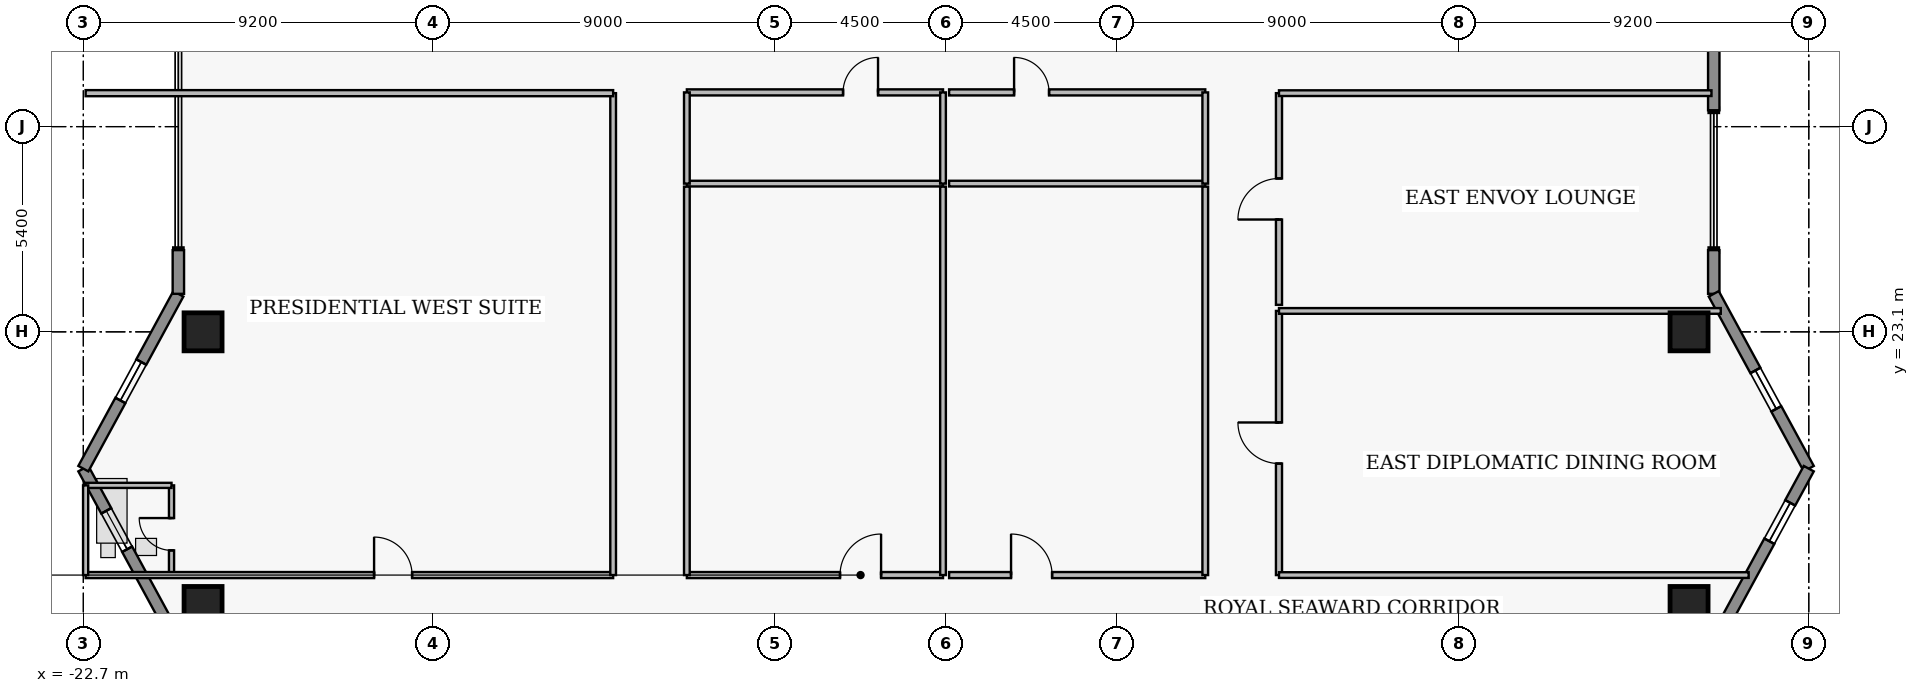
"""IFC4 building model, lengths in metres.
Left out: names, types, materials, properties, quantities, classifications, styles, units other than length and angle.
Written with IfcOpenShell. Run it as: python <this file> out.ifc"""

import sys

from ifc_helpers import new_model, si_unit, direction, frame, frame_2d, origin, origin_2d, place, context, subcontext, project, spatial, rectangle, extrude, element, fill, save


model = new_model("IFC4")
c1 = context("Model", 3, precision=1e-05, world=origin(), true_north=direction((0.0, 1.0)))
c2 = subcontext(c1, "Body", "Model", "MODEL_VIEW")
j1 = project(units=[si_unit("LENGTHUNIT", "METRE"), si_unit("PLANEANGLEUNIT", "RADIAN")], contexts=[c1])
p1 = place(None, origin())
s1 = spatial("IfcSite", under=j1, at=p1, CompositionType="ELEMENT")
p2 = place(p1, origin())
s2 = spatial("IfcBuilding", under=s1, at=p2, CompositionType="ELEMENT")
p3 = place(p2, frame((0.0, 0.0, 254.45)))
s3 = spatial("IfcBuildingStorey", under=s2, at=p3, CompositionType="ELEMENT", Elevation=254.45)
for number, where, z_axis, x_axis in (
    (1, (-19.55, 15.9, 0.0), (0.0, 0.0, 1.0), (1.0, 0.0, 0.0)),
    (2, (-19.55, 23.1, 0.0), (0.0, 0.0, 1.0), (1.0, 0.0, 0.0)),
    (3, (19.55, 15.9, 0.0), (0.0, 0.0, 1.0), (1.0, 0.0, 0.0)),
    (4, (19.55, 23.1, 0.0), (0.0, 0.0, 1.0), (1.0, 0.0, 0.0)),
):
    element("IfcColumn", number, at=place(p3, frame(where, z_axis=z_axis, x_axis=x_axis)), inside=s3, PredefinedType="COLUMN", context=c2, shape_type="SweptSolid", body=[
        extrude(rectangle(XDim=1.0, YDim=1.0, at=origin_2d()), origin(), (0.0, 0.0, 1.0), 3.7),
    ])
p4 = place(p3, frame((-20.2, 14.9, 0.0), z_axis=(0.0, 0.0, 1.0), x_axis=(-0.477505494629, 0.878628762675, 0.0)))
e5 = element("IfcWall", 5, at=p4, inside=s3, PredefinedType="STANDARD", context=c2, shape_type="SweptSolid", body=[
    extrude(rectangle(XDim=5.236, YDim=0.3, at=frame_2d((2.618, 0.0))), origin(), (0.0, 0.0, 1.0), 3.48),
])
p5 = place(p4, frame((2.823, 0.0, 1.25)))
e6 = element("IfcOpeningElement", 6, at=p5, cuts=e5, PredefinedType="OPENING", context=c2, shape_type="SweptSolid", body=[
    extrude(rectangle(XDim=1.15, YDim=1.55, at=frame_2d((0.575, 0.775))), frame((0.0, 0.16, 0.0), z_axis=(0.0, -1.0, 0.0), x_axis=(1.0, 0.0, 0.0)), (0.0, 0.0, 1.0), 0.32),
])
p6 = place(p3, frame((-22.7, 19.5, 0.0), z_axis=(0.0, 0.0, 1.0), x_axis=(0.477505494629, 0.878628762675, 0.0)))
e7 = element("IfcWall", 7, at=p6, inside=s3, PredefinedType="STANDARD", context=c2, shape_type="SweptSolid", body=[
    extrude(rectangle(XDim=5.236, YDim=0.3, at=frame_2d((2.618, 0.0))), origin(), (0.0, 0.0, 1.0), 3.48),
])
p7 = place(p6, frame((2.043, 0.0, 1.25)))
e8 = element("IfcOpeningElement", 8, at=p7, cuts=e7, PredefinedType="OPENING", context=c2, shape_type="SweptSolid", body=[
    extrude(rectangle(XDim=1.15, YDim=1.55, at=frame_2d((0.575, 0.775))), frame((0.0, 0.16, 0.0), z_axis=(0.0, -1.0, 0.0), x_axis=(1.0, 0.0, 0.0)), (0.0, 0.0, 1.0), 0.32),
])
p8 = place(p3, frame((-20.2, 24.1, 0.0), z_axis=(0.0, 0.0, 1.0), x_axis=(0.0, 1.0, 0.0)))
e9 = element("IfcWall", 9, at=p8, inside=s3, PredefinedType="STANDARD", context=c2, shape_type="SweptSolid", body=[
    extrude(rectangle(XDim=1.15, YDim=0.3, at=frame_2d((0.575, 0.0))), origin(), (0.0, 0.0, 1.0), 3.48),
])
p9 = place(p3, frame((20.2, 31.5, 0.0), z_axis=(0.0, 0.0, 1.0), x_axis=(0.0, -1.0, 0.0)))
e10 = element("IfcWall", 10, at=p9, inside=s3, PredefinedType="STANDARD", context=c2, shape_type="SweptSolid", body=[
    extrude(rectangle(XDim=2.57, YDim=0.3, at=frame_2d((1.285, 0.0))), origin(), (0.0, 0.0, 1.0), 3.48),
])
p10 = place(p3, frame((20.2, 25.25, 0.0), z_axis=(0.0, 0.0, 1.0), x_axis=(0.0, -1.0, 0.0)))
e11 = element("IfcWall", 11, at=p10, inside=s3, PredefinedType="STANDARD", context=c2, shape_type="SweptSolid", body=[
    extrude(rectangle(XDim=1.15, YDim=0.3, at=frame_2d((0.575, 0.0))), origin(), (0.0, 0.0, 1.0), 3.48),
])
p11 = place(p3, frame((20.2, 24.1, 0.0), z_axis=(0.0, 0.0, 1.0), x_axis=(0.477505494629, -0.878628762675, 0.0)))
e12 = element("IfcWall", 12, at=p11, inside=s3, PredefinedType="STANDARD", context=c2, shape_type="SweptSolid", body=[
    extrude(rectangle(XDim=5.236, YDim=0.3, at=frame_2d((2.618, 0.0))), origin(), (0.0, 0.0, 1.0), 3.48),
])
p12 = place(p11, frame((2.294, 0.0, 1.25)))
e13 = element("IfcOpeningElement", 13, at=p12, cuts=e12, PredefinedType="OPENING", context=c2, shape_type="SweptSolid", body=[
    extrude(rectangle(XDim=1.15, YDim=1.55, at=frame_2d((0.575, 0.775))), frame((0.0, 0.16, 0.0), z_axis=(0.0, -1.0, 0.0), x_axis=(1.0, 0.0, 0.0)), (0.0, 0.0, 1.0), 0.32),
])
p13 = place(p3, frame((22.7, 19.5, 0.0), z_axis=(0.0, 0.0, 1.0), x_axis=(-0.477505494629, -0.878628762675, 0.0)))
e14 = element("IfcWall", 14, at=p13, inside=s3, PredefinedType="STANDARD", context=c2, shape_type="SweptSolid", body=[
    extrude(rectangle(XDim=5.236, YDim=0.3, at=frame_2d((2.618, 0.0))), origin(), (0.0, 0.0, 1.0), 3.48),
])
p14 = place(p13, frame((1.023, 0.0, 1.25)))
e15 = element("IfcOpeningElement", 15, at=p14, cuts=e14, PredefinedType="OPENING", context=c2, shape_type="SweptSolid", body=[
    extrude(rectangle(XDim=1.15, YDim=1.55, at=frame_2d((0.575, 0.775))), frame((0.0, 0.16, 0.0), z_axis=(0.0, -1.0, 0.0), x_axis=(1.0, 0.0, 0.0)), (0.0, 0.0, 1.0), 0.32),
])
p15 = place(p3, frame((-6.82, 29.4, 0.0), z_axis=(0.0, 0.0, 1.0), x_axis=(1.0, 0.0, 0.0)))
e16 = element("IfcWall", 16, at=p15, inside=s3, PredefinedType="PARTITIONING", context=c2, shape_type="SweptSolid", body=[
    extrude(rectangle(XDim=6.74, YDim=0.16, at=frame_2d((3.37, 0.0))), origin(), (0.0, 0.0, 1.0), 3.48),
])
p16 = place(p15, frame((4.11, 0.0, 0.0)))
e17 = element("IfcOpeningElement", 17, at=p16, cuts=e16, PredefinedType="OPENING", context=c2, shape_type="SweptSolid", body=[
    extrude(rectangle(XDim=0.92, YDim=2.12, at=frame_2d((0.46, 1.06))), frame((0.0, 0.09, 0.0), z_axis=(0.0, -1.0, 0.0), x_axis=(1.0, 0.0, 0.0)), (0.0, 0.0, 1.0), 0.18),
])
p17 = place(p3, frame((0.08, 29.4, 0.0), z_axis=(0.0, 0.0, 1.0), x_axis=(1.0, 0.0, 0.0)))
e18 = element("IfcWall", 18, at=p17, inside=s3, PredefinedType="PARTITIONING", context=c2, shape_type="SweptSolid", body=[
    extrude(rectangle(XDim=6.74, YDim=0.16, at=frame_2d((3.37, 0.0))), origin(), (0.0, 0.0, 1.0), 3.48),
])
p18 = place(p17, frame((1.71, 0.0, 0.0)))
e19 = element("IfcOpeningElement", 19, at=p18, cuts=e18, PredefinedType="OPENING", context=c2, shape_type="SweptSolid", body=[
    extrude(rectangle(XDim=0.92, YDim=2.12, at=frame_2d((0.46, 1.06))), frame((0.0, 0.09, 0.0), z_axis=(0.0, -1.0, 0.0), x_axis=(1.0, 0.0, 0.0)), (0.0, 0.0, 1.0), 0.18),
])
p19 = place(p3, frame((-6.82, 16.7, 0.0), z_axis=(0.0, 0.0, 1.0), x_axis=(1.0, 0.0, 0.0)))
e20 = element("IfcWall", 20, at=p19, inside=s3, PredefinedType="PARTITIONING", context=c2, shape_type="SweptSolid", body=[
    extrude(rectangle(XDim=6.74, YDim=0.16, at=frame_2d((3.37, 0.0))), origin(), (0.0, 0.0, 1.0), 3.076),
])
p20 = place(p19, frame((4.03, 0.0, 0.0)))
e21 = element("IfcOpeningElement", 21, at=p20, cuts=e20, PredefinedType="OPENING", context=c2, shape_type="SweptSolid", body=[
    extrude(rectangle(XDim=1.08, YDim=2.18, at=frame_2d((0.54, 1.09))), frame((0.0, 0.09, 0.0), z_axis=(0.0, -1.0, 0.0), x_axis=(1.0, 0.0, 0.0)), (0.0, 0.0, 1.0), 0.18),
])
p21 = place(p3, frame((0.08, 16.7, 0.0), z_axis=(0.0, 0.0, 1.0), x_axis=(1.0, 0.0, 0.0)))
e22 = element("IfcWall", 22, at=p21, inside=s3, PredefinedType="PARTITIONING", context=c2, shape_type="SweptSolid", body=[
    extrude(rectangle(XDim=6.74, YDim=0.16, at=frame_2d((3.37, 0.0))), origin(), (0.0, 0.0, 1.0), 3.076),
])
p22 = place(p21, frame((1.63, 0.0, 0.0)))
e23 = element("IfcOpeningElement", 23, at=p22, cuts=e22, PredefinedType="OPENING", context=c2, shape_type="SweptSolid", body=[
    extrude(rectangle(XDim=1.08, YDim=2.18, at=frame_2d((0.54, 1.09))), frame((0.0, 0.09, 0.0), z_axis=(0.0, -1.0, 0.0), x_axis=(1.0, 0.0, 0.0)), (0.0, 0.0, 1.0), 0.18),
])
p23 = place(p3, frame((-20.38, 16.7, 0.0), z_axis=(0.0, 0.0, 1.0), x_axis=(0.0, 1.0, 0.0)))
e24 = element("IfcWall", 24, at=p23, inside=s3, PredefinedType="PLUMBINGWALL", context=c2, shape_type="SweptSolid", body=[
    extrude(rectangle(XDim=2.36, YDim=0.135, at=frame_2d((1.18, 0.0))), origin(), (0.0, 0.0, 1.0), 3.48),
])
p24 = place(p23, frame((0.65, 0.0, 0.0)))
e25 = element("IfcOpeningElement", 25, at=p24, cuts=e24, PredefinedType="OPENING", context=c2, shape_type="SweptSolid", body=[
    extrude(rectangle(XDim=0.85, YDim=2.1, at=frame_2d((0.425, 1.05))), frame((0.0, 0.077, 0.0), z_axis=(0.0, -1.0, 0.0), x_axis=(1.0, 0.0, 0.0)), (0.0, 0.0, 1.0), 0.155),
])
p25 = place(p3, frame((-22.64, 16.7, 0.0), z_axis=(0.0, 0.0, 1.0), x_axis=(1.0, 0.0, 0.0)))
e26 = element("IfcWall", 26, at=p25, inside=s3, PredefinedType="PARTITIONING", context=c2, shape_type="SweptSolid", body=[
    extrude(rectangle(XDim=13.88, YDim=0.16, at=frame_2d((6.94, 0.0))), origin(), (0.0, 0.0, 1.0), 3.076),
])
p26 = place(p25, frame((7.59, 0.0, 0.0)))
e27 = element("IfcOpeningElement", 27, at=p26, cuts=e26, PredefinedType="OPENING", context=c2, shape_type="SweptSolid", body=[
    extrude(rectangle(XDim=1.0, YDim=2.15, at=frame_2d((0.5, 1.075))), frame((0.0, 0.09, 0.0), z_axis=(0.0, -1.0, 0.0), x_axis=(1.0, 0.0, 0.0)), (0.0, 0.0, 1.0), 0.18),
])
p27 = place(p3, frame((8.76, 16.7, 0.0), z_axis=(0.0, 0.0, 1.0), x_axis=(0.0, 1.0, 0.0)))
e28 = element("IfcWall", 28, at=p27, inside=s3, PredefinedType="PARTITIONING", context=c2, shape_type="SweptSolid", body=[
    extrude(rectangle(XDim=6.95, YDim=0.16, at=frame_2d((3.475, 0.0))), origin(), (0.0, 0.0, 1.0), 3.48),
])
p28 = place(p27, frame((2.935, 0.0, 0.0)))
e29 = element("IfcOpeningElement", 29, at=p28, cuts=e28, PredefinedType="OPENING", context=c2, shape_type="SweptSolid", body=[
    extrude(rectangle(XDim=1.08, YDim=2.18, at=frame_2d((0.54, 1.09))), frame((0.0, 0.09, 0.0), z_axis=(0.0, -1.0, 0.0), x_axis=(1.0, 0.0, 0.0)), (0.0, 0.0, 1.0), 0.18),
])
p29 = place(p3, frame((8.76, 23.81, 0.0), z_axis=(0.0, 0.0, 1.0), x_axis=(0.0, 1.0, 0.0)))
e30 = element("IfcWall", 30, at=p29, inside=s3, PredefinedType="PARTITIONING", context=c2, shape_type="SweptSolid", body=[
    extrude(rectangle(XDim=5.57, YDim=0.16, at=frame_2d((2.785, 0.0))), origin(), (0.0, 0.0, 1.0), 3.48),
])
p30 = place(p29, frame((2.245, 0.0, 0.0)))
e31 = element("IfcOpeningElement", 31, at=p30, cuts=e30, PredefinedType="OPENING", context=c2, shape_type="SweptSolid", body=[
    extrude(rectangle(XDim=1.08, YDim=2.18, at=frame_2d((0.54, 1.09))), frame((0.0, 0.09, 0.0), z_axis=(0.0, -1.0, 0.0), x_axis=(1.0, 0.0, 0.0)), (0.0, 0.0, 1.0), 0.18),
])
p31 = place(p3, frame((-6.82, 27.0, 0.0), z_axis=(0.0, 0.0, 1.0), x_axis=(1.0, 0.0, 0.0)))
e32 = element("IfcWall", 32, at=p31, inside=s3, PredefinedType="PARTITIONING", context=c2, shape_type="SweptSolid", body=[
    extrude(rectangle(XDim=6.74, YDim=0.15, at=frame_2d((3.37, 0.0))), origin(), (0.0, 0.0, 1.0), 3.48),
])
for number, where, z_axis, x_axis in (
    (33, (-6.82, 27.0, 0.0), (0.0, 0.0, 1.0), (0.0, 1.0, 0.0)),
    (34, (-0.08, 27.0, 0.0), (0.0, 0.0, 1.0), (0.0, 1.0, 0.0)),
):
    element("IfcWall", number, at=place(p3, frame(where, z_axis=z_axis, x_axis=x_axis)), inside=s3, PredefinedType="PARTITIONING", context=c2, shape_type="SweptSolid", body=[
        extrude(rectangle(XDim=2.4, YDim=0.15, at=frame_2d((1.2, 0.0))), origin(), (0.0, 0.0, 1.0), 3.48),
    ])
p32 = place(p3, frame((0.08, 27.0, 0.0), z_axis=(0.0, 0.0, 1.0), x_axis=(1.0, 0.0, 0.0)))
e35 = element("IfcWall", 35, at=p32, inside=s3, PredefinedType="PARTITIONING", context=c2, shape_type="SweptSolid", body=[
    extrude(rectangle(XDim=6.74, YDim=0.15, at=frame_2d((3.37, 0.0))), origin(), (0.0, 0.0, 1.0), 3.48),
])
p33 = place(p3, frame((6.82, 27.0, 0.0), z_axis=(0.0, 0.0, 1.0), x_axis=(0.0, 1.0, 0.0)))
e36 = element("IfcWall", 36, at=p33, inside=s3, PredefinedType="PARTITIONING", context=c2, shape_type="SweptSolid", body=[
    extrude(rectangle(XDim=2.4, YDim=0.15, at=frame_2d((1.2, 0.0))), origin(), (0.0, 0.0, 1.0), 3.48),
])
for number, where, z_axis, x_axis in (
    (37, (-6.82, 16.7, 0.0), (0.0, 0.0, 1.0), (0.0, 1.0, 0.0)),
    (38, (-0.08, 16.7, 0.0), (0.0, 0.0, 1.0), (0.0, 1.0, 0.0)),
    (39, (6.82, 16.7, 0.0), (0.0, 0.0, 1.0), (0.0, 1.0, 0.0)),
):
    element("IfcWall", number, at=place(p3, frame(where, z_axis=z_axis, x_axis=x_axis)), inside=s3, PredefinedType="PARTITIONING", context=c2, shape_type="SweptSolid", body=[
        extrude(rectangle(XDim=10.22, YDim=0.15, at=frame_2d((5.11, 0.0))), origin(), (0.0, 0.0, 1.0), 3.48),
    ])
p34 = place(p3, frame((-22.64, 19.06, 0.0), z_axis=(0.0, 0.0, 1.0), x_axis=(1.0, 0.0, 0.0)))
e40 = element("IfcWall", 40, at=p34, inside=s3, PredefinedType="PLUMBINGWALL", context=c2, shape_type="SweptSolid", body=[
    extrude(rectangle(XDim=2.26, YDim=0.135, at=frame_2d((1.13, 0.0))), origin(), (0.0, 0.0, 1.0), 3.48),
])
p35 = place(p3, frame((-22.64, 16.7, 0.0), z_axis=(0.0, 0.0, 1.0), x_axis=(0.0, 1.0, 0.0)))
e41 = element("IfcWall", 41, at=p35, inside=s3, PredefinedType="PLUMBINGWALL", context=c2, shape_type="SweptSolid", body=[
    extrude(rectangle(XDim=2.36, YDim=0.135, at=frame_2d((1.18, 0.0))), origin(), (0.0, 0.0, 1.0), 3.48),
])
p36 = place(p3, frame((-8.76, 16.7, 0.0), z_axis=(0.0, 0.0, 1.0), x_axis=(0.0, 1.0, 0.0)))
e42 = element("IfcWall", 42, at=p36, inside=s3, PredefinedType="PARTITIONING", context=c2, shape_type="SweptSolid", body=[
    extrude(rectangle(XDim=12.68, YDim=0.15, at=frame_2d((6.34, 0.0))), origin(), (0.0, 0.0, 1.0), 3.48),
])
p37 = place(p3, frame((-22.64, 29.38, 0.0), z_axis=(0.0, 0.0, 1.0), x_axis=(1.0, 0.0, 0.0)))
e43 = element("IfcWall", 43, at=p37, inside=s3, PredefinedType="PARTITIONING", context=c2, shape_type="SweptSolid", body=[
    extrude(rectangle(XDim=13.88, YDim=0.16, at=frame_2d((6.94, 0.0))), origin(), (0.0, 0.0, 1.0), 3.48),
])
p38 = place(p3, frame((8.76, 16.7, 0.0), z_axis=(0.0, 0.0, 1.0), x_axis=(1.0, 0.0, 0.0)))
e44 = element("IfcWall", 44, at=p38, inside=s3, PredefinedType="PARTITIONING", context=c2, shape_type="SweptSolid", body=[
    extrude(rectangle(XDim=12.358, YDim=0.15, at=frame_2d((6.179, 0.0))), origin(), (0.0, 0.0, 1.0), 3.076),
])
p39 = place(p3, frame((8.76, 23.65, 0.0), z_axis=(0.0, 0.0, 1.0), x_axis=(1.0, 0.0, 0.0)))
e45 = element("IfcWall", 45, at=p39, inside=s3, PredefinedType="PARTITIONING", context=c2, shape_type="SweptSolid", body=[
    extrude(rectangle(XDim=11.625, YDim=0.15, at=frame_2d((5.812, 0.0))), origin(), (0.0, 0.0, 1.0), 3.48),
])
p40 = place(p3, frame((8.76, 29.38, 0.0), z_axis=(0.0, 0.0, 1.0), x_axis=(1.0, 0.0, 0.0)))
e46 = element("IfcWall", 46, at=p40, inside=s3, PredefinedType="PARTITIONING", context=c2, shape_type="SweptSolid", body=[
    extrude(rectangle(XDim=11.38, YDim=0.15, at=frame_2d((5.69, 0.0))), origin(), (0.0, 0.0, 1.0), 3.48),
])
p41 = place(p5, origin())
e47 = element("IfcWindow", 47, at=p41, inside=s3, PartitioningType="SINGLE_PANEL", PredefinedType="WINDOW", context=c2, shape_type="SweptSolid", body=[
    extrude(rectangle(XDim=1.15, YDim=1.55, at=frame_2d((0.575, 0.775))), frame((0.0, 0.03, 0.0), z_axis=(0.0, -1.0, 0.0), x_axis=(1.0, 0.0, 0.0)), (0.0, 0.0, 1.0), 0.06),
])
fill(e6, e47)
p42 = place(p7, origin())
e48 = element("IfcWindow", 48, at=p42, inside=s3, PartitioningType="SINGLE_PANEL", PredefinedType="WINDOW", context=c2, shape_type="SweptSolid", body=[
    extrude(rectangle(XDim=1.15, YDim=1.55, at=frame_2d((0.575, 0.775))), frame((0.0, 0.03, 0.0), z_axis=(0.0, -1.0, 0.0), x_axis=(1.0, 0.0, 0.0)), (0.0, 0.0, 1.0), 0.06),
])
fill(e8, e48)
p43 = place(p12, origin())
e49 = element("IfcWindow", 49, at=p43, inside=s3, PartitioningType="SINGLE_PANEL", PredefinedType="WINDOW", context=c2, shape_type="SweptSolid", body=[
    extrude(rectangle(XDim=1.15, YDim=1.55, at=frame_2d((0.575, 0.775))), frame((0.0, 0.03, 0.0), z_axis=(0.0, -1.0, 0.0), x_axis=(1.0, 0.0, 0.0)), (0.0, 0.0, 1.0), 0.06),
])
fill(e13, e49)
p44 = place(p14, origin())
e50 = element("IfcWindow", 50, at=p44, inside=s3, PartitioningType="SINGLE_PANEL", PredefinedType="WINDOW", context=c2, shape_type="SweptSolid", body=[
    extrude(rectangle(XDim=1.15, YDim=1.55, at=frame_2d((0.575, 0.775))), frame((0.0, 0.03, 0.0), z_axis=(0.0, -1.0, 0.0), x_axis=(1.0, 0.0, 0.0)), (0.0, 0.0, 1.0), 0.06),
])
fill(e15, e50)
p45 = place(p16, origin())
e51 = element("IfcDoor", 51, at=p45, inside=s3, OperationType="SINGLE_SWING_RIGHT", PredefinedType="DOOR", context=c2, shape_type="SweptSolid", body=[
    extrude(rectangle(XDim=0.92, YDim=2.12, at=frame_2d((0.46, 1.06))), frame((0.0, 0.025, 0.0), z_axis=(0.0, -1.0, 0.0), x_axis=(1.0, 0.0, 0.0)), (0.0, 0.0, 1.0), 0.05),
])
fill(e17, e51)
p46 = place(p18, origin())
e52 = element("IfcDoor", 52, at=p46, inside=s3, OperationType="SINGLE_SWING_LEFT", PredefinedType="DOOR", context=c2, shape_type="SweptSolid", body=[
    extrude(rectangle(XDim=0.92, YDim=2.12, at=frame_2d((0.46, 1.06))), frame((0.0, 0.025, 0.0), z_axis=(0.0, -1.0, 0.0), x_axis=(1.0, 0.0, 0.0)), (0.0, 0.0, 1.0), 0.05),
])
fill(e19, e52)
p47 = place(p20, origin())
e53 = element("IfcDoor", 53, at=p47, inside=s3, OperationType="SINGLE_SWING_RIGHT", PredefinedType="DOOR", context=c2, shape_type="SweptSolid", body=[
    extrude(rectangle(XDim=1.08, YDim=2.18, at=frame_2d((0.54, 1.09))), frame((0.0, 0.025, 0.0), z_axis=(0.0, -1.0, 0.0), x_axis=(1.0, 0.0, 0.0)), (0.0, 0.0, 1.0), 0.05),
])
fill(e21, e53)
p48 = place(p22, origin())
e54 = element("IfcDoor", 54, at=p48, inside=s3, OperationType="SINGLE_SWING_LEFT", PredefinedType="DOOR", context=c2, shape_type="SweptSolid", body=[
    extrude(rectangle(XDim=1.08, YDim=2.18, at=frame_2d((0.54, 1.09))), frame((0.0, 0.025, 0.0), z_axis=(0.0, -1.0, 0.0), x_axis=(1.0, 0.0, 0.0)), (0.0, 0.0, 1.0), 0.05),
])
fill(e23, e54)
p49 = place(p24, origin())
e55 = element("IfcDoor", 55, at=p49, inside=s3, OperationType="SINGLE_SWING_RIGHT", PredefinedType="DOOR", context=c2, shape_type="SweptSolid", body=[
    extrude(rectangle(XDim=0.85, YDim=2.1, at=frame_2d((0.425, 1.05))), frame((0.0, 0.025, 0.0), z_axis=(0.0, -1.0, 0.0), x_axis=(1.0, 0.0, 0.0)), (0.0, 0.0, 1.0), 0.05),
])
fill(e25, e55)
p50 = place(p26, origin())
e56 = element("IfcDoor", 56, at=p50, inside=s3, OperationType="SINGLE_SWING_LEFT", PredefinedType="DOOR", context=c2, shape_type="SweptSolid", body=[
    extrude(rectangle(XDim=1.0, YDim=2.15, at=frame_2d((0.5, 1.075))), frame((0.0, 0.025, 0.0), z_axis=(0.0, -1.0, 0.0), x_axis=(1.0, 0.0, 0.0)), (0.0, 0.0, 1.0), 0.05),
])
fill(e27, e56)
p51 = place(p28, origin())
e57 = element("IfcDoor", 57, at=p51, inside=s3, OperationType="SINGLE_SWING_RIGHT", PredefinedType="DOOR", context=c2, shape_type="SweptSolid", body=[
    extrude(rectangle(XDim=1.08, YDim=2.18, at=frame_2d((0.54, 1.09))), frame((0.0, 0.025, 0.0), z_axis=(0.0, -1.0, 0.0), x_axis=(1.0, 0.0, 0.0)), (0.0, 0.0, 1.0), 0.05),
])
fill(e29, e57)
p52 = place(p30, origin())
e58 = element("IfcDoor", 58, at=p52, inside=s3, OperationType="SINGLE_SWING_LEFT", PredefinedType="DOOR", context=c2, shape_type="SweptSolid", body=[
    extrude(rectangle(XDim=1.08, YDim=2.18, at=frame_2d((0.54, 1.09))), frame((0.0, 0.025, 0.0), z_axis=(0.0, -1.0, 0.0), x_axis=(1.0, 0.0, 0.0)), (0.0, 0.0, 1.0), 0.05),
])
fill(e31, e58)
save(model, sys.argv[1])
